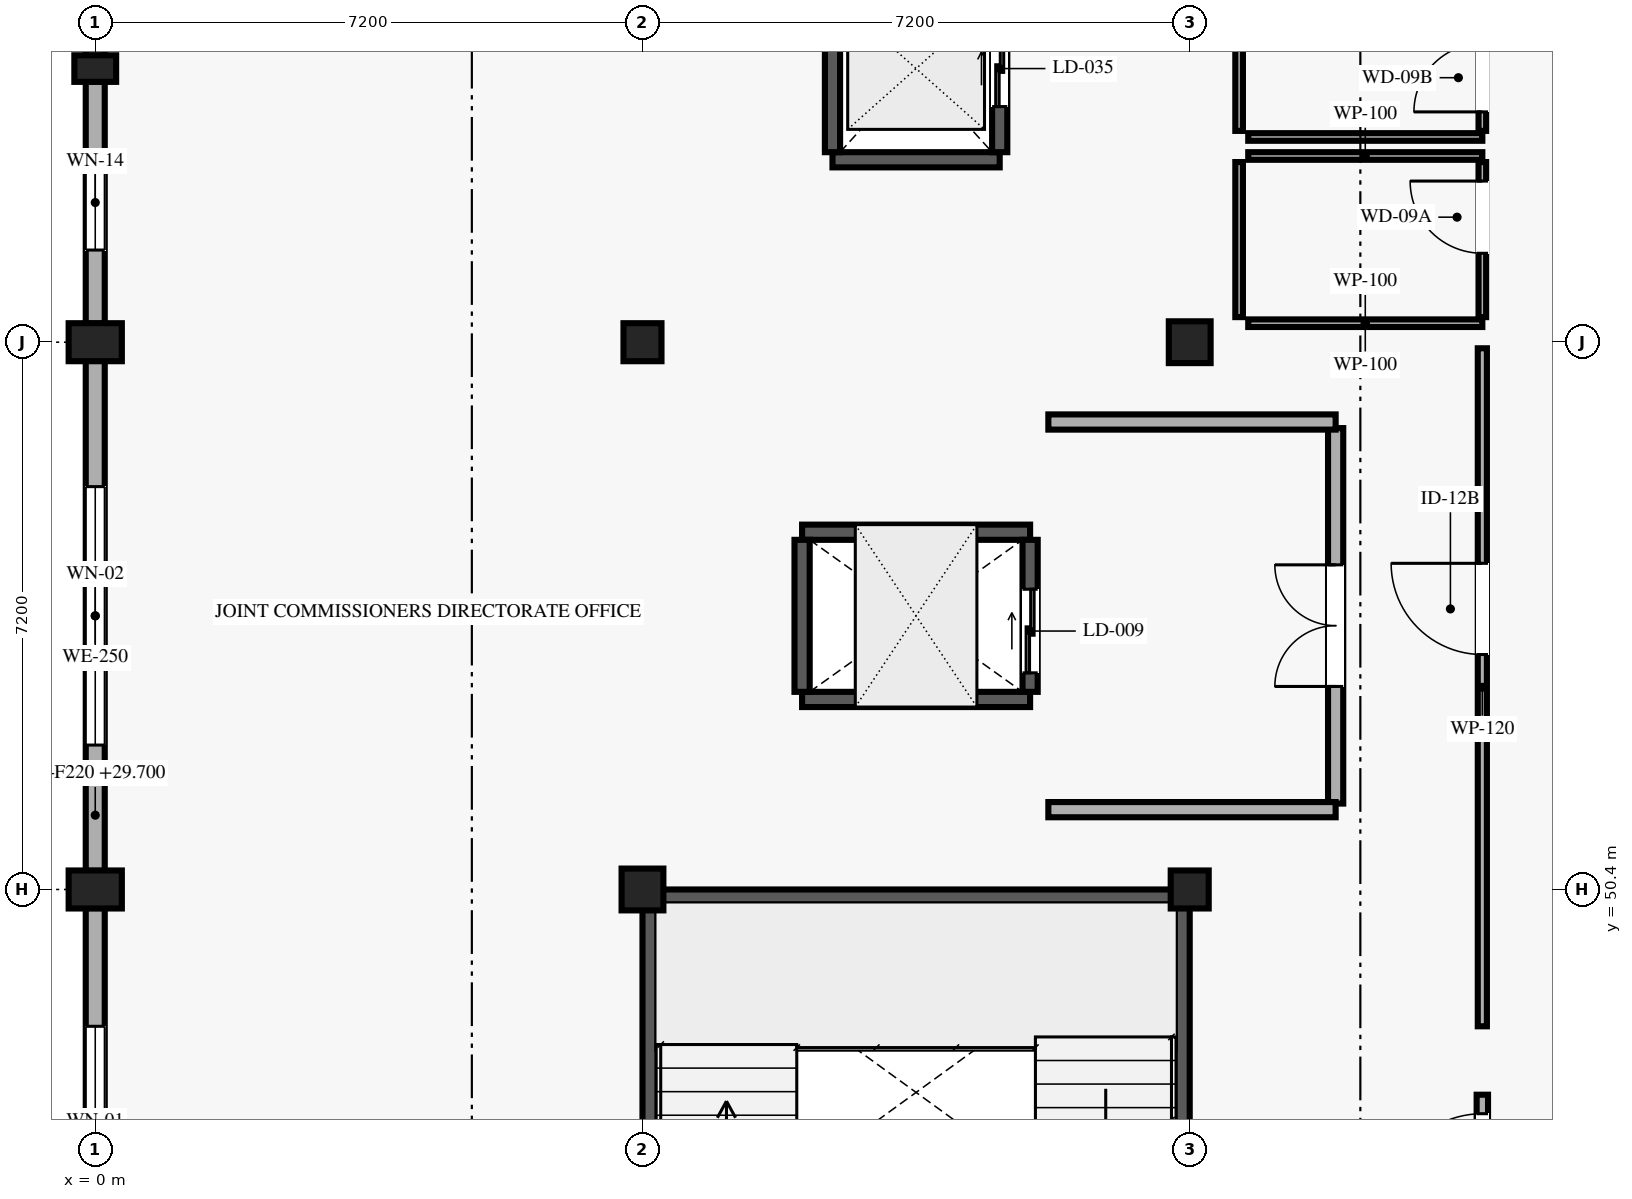
"""IFC4 building model, lengths in metres.
Left out: names, types, materials, properties, quantities, classifications, styles, units other than length and angle.
Written with IfcOpenShell. Run it as: python <this file> out.ifc"""

import sys

from ifc_helpers import new_model, si_unit, direction, frame, frame_2d, origin, origin_2d, place, context, subcontext, project, spatial, rectangle, extrude, element, fill, save


model = new_model("IFC4")
c1 = context("Model", 3, precision=1e-05, world=origin(), true_north=direction((0.0, 1.0)))
c2 = subcontext(c1, "Body", "Model", "MODEL_VIEW")
j1 = project(units=[si_unit("LENGTHUNIT", "METRE"), si_unit("PLANEANGLEUNIT", "RADIAN")], contexts=[c1])
p1 = place(None, origin())
s1 = spatial("IfcSite", under=j1, at=p1, CompositionType="ELEMENT")
p2 = place(p1, origin())
s2 = spatial("IfcBuilding", under=s1, at=p2, CompositionType="ELEMENT")
p3 = place(p2, frame((0.0, 0.0, 29.7)))
s3 = spatial("IfcBuildingStorey", under=s2, at=p3, CompositionType="ELEMENT", Elevation=29.7)
for number, where, z_axis, x_axis in (
    (1, (0.0, 50.4, 0.0), (0.0, 0.0, 1.0), (0.0, 1.0, 0.0)),
    (2, (0.0, 57.6, 0.0), (0.0, 0.0, 1.0), (0.0, 1.0, 0.0)),
):
    element("IfcColumn", number, at=place(p3, frame(where, z_axis=z_axis, x_axis=x_axis)), inside=s3, PredefinedType="COLUMN", context=c2, shape_type="SweptSolid", body=[
        extrude(rectangle(XDim=0.5, YDim=0.7, at=origin_2d()), origin(), (0.0, 0.0, 1.0), 4.05),
    ])
p4 = place(p3, frame((7.2, 50.4, 0.0), z_axis=(0.0, 0.0, 1.0), x_axis=(1.0, 0.0, 0.0)))
e3 = element("IfcColumn", 3, at=p4, inside=s3, PredefinedType="COLUMN", context=c2, shape_type="SweptSolid", body=[
    extrude(rectangle(XDim=0.55, YDim=0.55, at=origin_2d()), origin(), (0.0, 0.0, 1.0), 4.05),
])
for number, where, z_axis, x_axis in (
    (4, (7.2, 57.6, 0.0), (0.0, 0.0, 1.0), (1.0, 0.0, 0.0)),
    (5, (14.4, 50.4, 0.0), (0.0, 0.0, 1.0), (1.0, 0.0, 0.0)),
):
    element("IfcColumn", number, at=place(p3, frame(where, z_axis=z_axis, x_axis=x_axis)), inside=s3, PredefinedType="COLUMN", context=c2, shape_type="SweptSolid", body=[
        extrude(rectangle(XDim=0.5, YDim=0.5, at=origin_2d()), origin(), (0.0, 0.0, 1.0), 4.05),
    ])
p5 = place(p3, frame((14.4, 57.6, 0.0), z_axis=(0.0, 0.0, 1.0), x_axis=(1.0, 0.0, 0.0)))
e6 = element("IfcColumn", 6, at=p5, inside=s3, PredefinedType="COLUMN", context=c2, shape_type="SweptSolid", body=[
    extrude(rectangle(XDim=0.55, YDim=0.55, at=origin_2d()), origin(), (0.0, 0.0, 1.0), 4.05),
])
p6 = place(p3, frame((0.0, 61.2, 0.0), z_axis=(0.0, 0.0, 1.0), x_axis=(0.0, 1.0, 0.0)))
e7 = element("IfcColumn", 7, at=p6, inside=s3, PredefinedType="PILASTER", context=c2, shape_type="SweptSolid", body=[
    extrude(rectangle(XDim=0.35, YDim=0.55, at=origin_2d()), origin(), (0.0, 0.0, 1.0), 4.05),
])
p7 = place(p3, frame((0.0, 43.445, 0.0), z_axis=(0.0, 0.0, 1.0), x_axis=(0.0, 1.0, 0.0)))
e8 = element("IfcWall", 8, at=p7, inside=s3, PredefinedType="SOLIDWALL", context=c2, shape_type="SweptSolid", body=[
    extrude(rectangle(XDim=6.71, YDim=0.25, at=frame_2d((3.355, 0.0))), origin(), (0.0, 0.0, 1.0), 3.295),
])
p8 = place(p7, frame((1.555, 0.0, 0.85)))
e9 = element("IfcOpeningElement", 9, at=p8, cuts=e8, PredefinedType="OPENING", context=c2, shape_type="SweptSolid", body=[
    extrude(rectangle(XDim=3.6, YDim=2.05, at=frame_2d((1.8, 1.025))), frame((0.0, 0.135, 0.0), z_axis=(0.0, -1.0, 0.0), x_axis=(1.0, 0.0, 0.0)), (0.0, 0.0, 1.0), 0.27),
])
p9 = place(p3, frame((0.0, 50.645, 0.0), z_axis=(0.0, 0.0, 1.0), x_axis=(0.0, 1.0, 0.0)))
e10 = element("IfcWall", 10, at=p9, inside=s3, PredefinedType="SOLIDWALL", context=c2, shape_type="SweptSolid", body=[
    extrude(rectangle(XDim=6.71, YDim=0.25, at=frame_2d((3.355, 0.0))), origin(), (0.0, 0.0, 1.0), 3.295),
])
p10 = place(p9, frame((1.655, 0.0, 0.85)))
e11 = element("IfcOpeningElement", 11, at=p10, cuts=e10, PredefinedType="OPENING", context=c2, shape_type="SweptSolid", body=[
    extrude(rectangle(XDim=3.4, YDim=2.0, at=frame_2d((1.7, 1.0))), frame((0.0, 0.135, 0.0), z_axis=(0.0, -1.0, 0.0), x_axis=(1.0, 0.0, 0.0)), (0.0, 0.0, 1.0), 0.27),
])
p11 = place(p3, frame((0.0, 57.845, 0.0), z_axis=(0.0, 0.0, 1.0), x_axis=(0.0, 1.0, 0.0)))
e12 = element("IfcWall", 12, at=p11, inside=s3, PredefinedType="SOLIDWALL", context=c2, shape_type="SweptSolid", body=[
    extrude(rectangle(XDim=3.185, YDim=0.25, at=frame_2d((1.593, 0.0))), origin(), (0.0, 0.0, 1.0), 3.295),
])
p12 = place(p11, frame((0.968, 0.0, 0.85)))
e13 = element("IfcOpeningElement", 13, at=p12, cuts=e12, PredefinedType="OPENING", context=c2, shape_type="SweptSolid", body=[
    extrude(rectangle(XDim=1.25, YDim=1.5, at=frame_2d((0.625, 0.75))), frame((0.0, 0.135, 0.0), z_axis=(0.0, -1.0, 0.0), x_axis=(1.0, 0.0, 0.0)), (0.0, 0.0, 1.0), 0.27),
])
p13 = place(p3, frame((0.0, 61.37, 0.0), z_axis=(0.0, 0.0, 1.0), x_axis=(0.0, 1.0, 0.0)))
e14 = element("IfcWall", 14, at=p13, inside=s3, PredefinedType="SOLIDWALL", context=c2, shape_type="SweptSolid", body=[
    extrude(rectangle(XDim=3.185, YDim=0.25, at=frame_2d((1.592, 0.0))), origin(), (0.0, 0.0, 1.0), 3.295),
])
p14 = place(p13, frame((0.968, 0.0, 0.85)))
e15 = element("IfcOpeningElement", 15, at=p14, cuts=e14, PredefinedType="OPENING", context=c2, shape_type="SweptSolid", body=[
    extrude(rectangle(XDim=1.25, YDim=1.5, at=frame_2d((0.625, 0.75))), frame((0.0, 0.135, 0.0), z_axis=(0.0, -1.0, 0.0), x_axis=(1.0, 0.0, 0.0)), (0.0, 0.0, 1.0), 0.27),
])
for number, where, z_axis, x_axis in (
    (16, (7.4, 50.3, 0.0), (0.0, 0.0, 1.0), (1.0, 0.0, 0.0)),
    (17, (7.3, 43.4, 0.0), (0.0, 0.0, 1.0), (0.0, 1.0, 0.0)),
    (18, (14.3, 43.4, 0.0), (0.0, 0.0, 1.0), (0.0, 1.0, 0.0)),
):
    element("IfcWall", number, at=place(p3, frame(where, z_axis=z_axis, x_axis=x_axis)), inside=s3, PredefinedType="SHEAR", context=c2, shape_type="SweptSolid", body=[
        extrude(rectangle(XDim=6.8, YDim=0.2, at=frame_2d((3.4, 0.0))), origin(), (0.0, 0.0, 1.0), 3.83),
    ])
for number, where, z_axis, x_axis in (
    (19, (9.3, 52.9, 0.0), (0.0, 0.0, 1.0), (1.0, 0.0, 0.0)),
    (20, (9.3, 55.1, 0.0), (0.0, 0.0, 1.0), (1.0, 0.0, 0.0)),
):
    element("IfcWall", number, at=place(p3, frame(where, z_axis=z_axis, x_axis=x_axis)), inside=s3, PredefinedType="SHEAR", context=c2, shape_type="SweptSolid", body=[
        extrude(rectangle(XDim=3.0, YDim=0.2, at=frame_2d((1.5, 0.0))), origin(), (0.0, 0.0, 1.0), 3.83),
    ])
p15 = place(p3, frame((9.3, 53.0, 0.0), z_axis=(0.0, 0.0, 1.0), x_axis=(0.0, 1.0, 0.0)))
e21 = element("IfcWall", 21, at=p15, inside=s3, PredefinedType="SHEAR", context=c2, shape_type="SweptSolid", body=[
    extrude(rectangle(XDim=2.0, YDim=0.2, at=frame_2d((1.0, 0.0))), origin(), (0.0, 0.0, 1.0), 3.83),
])
p16 = place(p3, frame((12.3, 53.0, 0.0), z_axis=(0.0, 0.0, 1.0), x_axis=(0.0, 1.0, 0.0)))
e22 = element("IfcWall", 22, at=p16, inside=s3, PredefinedType="SHEAR", context=c2, shape_type="SweptSolid", body=[
    extrude(rectangle(XDim=2.0, YDim=0.2, at=frame_2d((1.0, 0.0))), origin(), (0.0, 0.0, 1.0), 3.83),
])
p17 = place(p16, frame((0.25, 0.0, 0.0)))
e23 = element("IfcOpeningElement", 23, at=p17, cuts=e22, PredefinedType="OPENING", context=c2, shape_type="SweptSolid", body=[
    extrude(rectangle(XDim=1.1, YDim=2.15, at=frame_2d((0.55, 1.075))), frame((0.0, 0.11, 0.0), z_axis=(0.0, -1.0, 0.0), x_axis=(1.0, 0.0, 0.0)), (0.0, 0.0, 1.0), 0.22),
])
for number, where, z_axis, x_axis in (
    (24, (9.7, 60.0, 0.0), (0.0, 0.0, 1.0), (1.0, 0.0, 0.0)),
    (25, (9.7, 60.1, 0.0), (0.0, 0.0, 1.0), (0.0, 1.0, 0.0)),
):
    element("IfcWall", number, at=place(p3, frame(where, z_axis=z_axis, x_axis=x_axis)), inside=s3, PredefinedType="SHEAR", context=c2, shape_type="SweptSolid", body=[
        extrude(rectangle(XDim=2.2, YDim=0.2, at=frame_2d((1.1, 0.0))), origin(), (0.0, 0.0, 1.0), 3.83),
    ])
p18 = place(p3, frame((11.9, 60.1, 0.0), z_axis=(0.0, 0.0, 1.0), x_axis=(0.0, 1.0, 0.0)))
e26 = element("IfcWall", 26, at=p18, inside=s3, PredefinedType="SHEAR", context=c2, shape_type="SweptSolid", body=[
    extrude(rectangle(XDim=2.2, YDim=0.2, at=frame_2d((1.1, 0.0))), origin(), (0.0, 0.0, 1.0), 3.83),
])
p19 = place(p18, frame((0.6, 0.0, 0.0)))
e27 = element("IfcOpeningElement", 27, at=p19, cuts=e26, PredefinedType="OPENING", context=c2, shape_type="SweptSolid", body=[
    extrude(rectangle(XDim=1.0, YDim=2.1, at=frame_2d((0.5, 1.05))), frame((0.0, 0.11, 0.0), z_axis=(0.0, -1.0, 0.0), x_axis=(1.0, 0.0, 0.0)), (0.0, 0.0, 1.0), 0.22),
])
p20 = place(p3, frame((16.32, 51.53, 0.0), z_axis=(0.0, 0.0, 1.0), x_axis=(0.0, 1.0, 0.0)))
e28 = element("IfcWall", 28, at=p20, inside=s3, PredefinedType="SOLIDWALL", context=c2, shape_type="SweptSolid", body=[
    extrude(rectangle(XDim=4.94, YDim=0.2, at=frame_2d((2.47, 0.0))), origin(), (0.0, 0.0, 1.0), 3.83),
])
p21 = place(p20, frame((1.541, 0.0, 0.0)))
e29 = element("IfcOpeningElement", 29, at=p21, cuts=e28, PredefinedType="OPENING", context=c2, shape_type="SweptSolid", body=[
    extrude(rectangle(XDim=1.6, YDim=2.2, at=frame_2d((0.8, 1.1))), frame((0.0, 0.11, 0.0), z_axis=(0.0, -1.0, 0.0), x_axis=(1.0, 0.0, 0.0)), (0.0, 0.0, 1.0), 0.22),
])
for number, where, z_axis, x_axis in (
    (30, (12.54, 51.45, 0.0), (0.0, 0.0, 1.0), (1.0, 0.0, 0.0)),
    (31, (12.54, 56.55, 0.0), (0.0, 0.0, 1.0), (1.0, 0.0, 0.0)),
):
    element("IfcWall", number, at=place(p3, frame(where, z_axis=z_axis, x_axis=x_axis)), inside=s3, PredefinedType="SOLIDWALL", context=c2, shape_type="SweptSolid", body=[
        extrude(rectangle(XDim=3.78, YDim=0.2, at=frame_2d((1.89, 0.0))), origin(), (0.0, 0.0, 1.0), 3.83),
    ])
p22 = place(p3, frame((18.25, 57.93, 0.0), z_axis=(0.0, 0.0, 1.0), x_axis=(0.0, 1.0, 0.0)))
e32 = element("IfcWall", 32, at=p22, inside=s3, PredefinedType="PARTITIONING", context=c2, shape_type="SweptSolid", body=[
    extrude(rectangle(XDim=2.04, YDim=0.1, at=frame_2d((1.02, 0.0))), origin(), (0.0, 0.0, 1.0), 3.83),
])
p23 = place(p22, frame((0.84, 0.0, 0.0)))
e33 = element("IfcOpeningElement", 33, at=p23, cuts=e32, PredefinedType="OPENING", context=c2, shape_type="SweptSolid", body=[
    extrude(rectangle(XDim=0.95, YDim=2.1, at=frame_2d((0.475, 1.05))), frame((0.0, 0.06, 0.0), z_axis=(0.0, -1.0, 0.0), x_axis=(1.0, 0.0, 0.0)), (0.0, 0.0, 1.0), 0.12),
])
p24 = place(p3, frame((15.17, 57.85, 0.0), z_axis=(0.0, 0.0, 1.0), x_axis=(1.0, 0.0, 0.0)))
e34 = element("IfcWall", 34, at=p24, inside=s3, PredefinedType="PARTITIONING", context=c2, shape_type="SweptSolid", body=[
    extrude(rectangle(XDim=3.08, YDim=0.1, at=frame_2d((1.54, 0.0))), origin(), (0.0, 0.0, 1.0), 3.32),
])
p25 = place(p3, frame((15.17, 60.05, 0.0), z_axis=(0.0, 0.0, 1.0), x_axis=(1.0, 0.0, 0.0)))
e35 = element("IfcWall", 35, at=p25, inside=s3, PredefinedType="PARTITIONING", context=c2, shape_type="SweptSolid", body=[
    extrude(rectangle(XDim=3.08, YDim=0.1, at=frame_2d((1.54, 0.0))), origin(), (0.0, 0.0, 1.0), 3.83),
])
p26 = place(p3, frame((15.05, 57.93, 0.0), z_axis=(0.0, 0.0, 1.0), x_axis=(0.0, 1.0, 0.0)))
e36 = element("IfcWall", 36, at=p26, inside=s3, PredefinedType="PARTITIONING", context=c2, shape_type="SweptSolid", body=[
    extrude(rectangle(XDim=2.04, YDim=0.1, at=frame_2d((1.02, 0.0))), origin(), (0.0, 0.0, 1.0), 3.83),
])
p27 = place(p3, frame((18.25, 60.38, 0.0), z_axis=(0.0, 0.0, 1.0), x_axis=(0.0, 1.0, 0.0)))
e37 = element("IfcWall", 37, at=p27, inside=s3, PredefinedType="PARTITIONING", context=c2, shape_type="SweptSolid", body=[
    extrude(rectangle(XDim=2.29, YDim=0.1, at=frame_2d((1.145, 0.0))), origin(), (0.0, 0.0, 1.0), 3.83),
])
p28 = place(p27, frame((0.25, 0.0, 0.0)))
e38 = element("IfcOpeningElement", 38, at=p28, cuts=e37, PredefinedType="OPENING", context=c2, shape_type="SweptSolid", body=[
    extrude(rectangle(XDim=0.9, YDim=2.1, at=frame_2d((0.45, 1.05))), frame((0.0, 0.06, 0.0), z_axis=(0.0, -1.0, 0.0), x_axis=(1.0, 0.0, 0.0)), (0.0, 0.0, 1.0), 0.12),
])
p29 = place(p3, frame((15.17, 60.3, 0.0), z_axis=(0.0, 0.0, 1.0), x_axis=(1.0, 0.0, 0.0)))
e39 = element("IfcWall", 39, at=p29, inside=s3, PredefinedType="PARTITIONING", context=c2, shape_type="SweptSolid", body=[
    extrude(rectangle(XDim=3.08, YDim=0.1, at=frame_2d((1.54, 0.0))), origin(), (0.0, 0.0, 1.0), 3.83),
])
p30 = place(p3, frame((15.05, 60.38, 0.0), z_axis=(0.0, 0.0, 1.0), x_axis=(0.0, 1.0, 0.0)))
e40 = element("IfcWall", 40, at=p30, inside=s3, PredefinedType="PARTITIONING", context=c2, shape_type="SweptSolid", body=[
    extrude(rectangle(XDim=2.29, YDim=0.1, at=frame_2d((1.145, 0.0))), origin(), (0.0, 0.0, 1.0), 3.83),
])
p31 = place(p3, frame((18.25, 36.55, 0.0), z_axis=(0.0, 0.0, 1.0), x_axis=(0.0, 1.0, 0.0)))
e41 = element("IfcWall", 41, at=p31, inside=s3, PredefinedType="PARTITIONING", context=c2, shape_type="SweptSolid", body=[
    extrude(rectangle(XDim=11.15, YDim=0.15, at=frame_2d((5.575, 0.0))), origin(), (0.0, 0.0, 1.0), 3.83),
])
p32 = place(p31, frame((9.65, 0.0, 0.0)))
e42 = element("IfcOpeningElement", 42, at=p32, cuts=e41, PredefinedType="OPENING", context=c2, shape_type="SweptSolid", body=[
    extrude(rectangle(XDim=1.25, YDim=2.2, at=frame_2d((0.625, 1.1))), frame((0.0, 0.085, 0.0), z_axis=(0.0, -1.0, 0.0), x_axis=(1.0, 0.0, 0.0)), (0.0, 0.0, 1.0), 0.17),
])
p33 = place(p3, frame((18.25, 48.6, 0.0), z_axis=(0.0, 0.0, 1.0), x_axis=(0.0, 1.0, 0.0)))
e43 = element("IfcWall", 43, at=p33, inside=s3, PredefinedType="PARTITIONING", context=c2, shape_type="SweptSolid", body=[
    extrude(rectangle(XDim=8.92, YDim=0.12, at=frame_2d((4.46, 0.0))), origin(), (0.0, 0.0, 1.0), 3.83),
])
p34 = place(p33, frame((4.891, 0.0, 0.0)))
e44 = element("IfcOpeningElement", 44, at=p34, cuts=e43, PredefinedType="OPENING", context=c2, shape_type="SweptSolid", body=[
    extrude(rectangle(XDim=1.2, YDim=2.15, at=frame_2d((0.6, 1.075))), frame((0.0, 0.07, 0.0), z_axis=(0.0, -1.0, 0.0), x_axis=(1.0, 0.0, 0.0)), (0.0, 0.0, 1.0), 0.14),
])
p35 = place(p8, origin())
e45 = element("IfcWindow", 45, at=p35, inside=s3, PartitioningType="SINGLE_PANEL", PredefinedType="WINDOW", context=c2, shape_type="SweptSolid", body=[
    extrude(rectangle(XDim=3.6, YDim=2.05, at=frame_2d((1.8, 1.025))), frame((0.0, 0.03, 0.0), z_axis=(0.0, -1.0, 0.0), x_axis=(1.0, 0.0, 0.0)), (0.0, 0.0, 1.0), 0.06),
])
fill(e9, e45)
p36 = place(p10, origin())
e46 = element("IfcWindow", 46, at=p36, inside=s3, PartitioningType="SINGLE_PANEL", PredefinedType="WINDOW", context=c2, shape_type="SweptSolid", body=[
    extrude(rectangle(XDim=3.4, YDim=2.0, at=frame_2d((1.7, 1.0))), frame((0.0, 0.03, 0.0), z_axis=(0.0, -1.0, 0.0), x_axis=(1.0, 0.0, 0.0)), (0.0, 0.0, 1.0), 0.06),
])
fill(e11, e46)
p37 = place(p12, origin())
e47 = element("IfcWindow", 47, at=p37, inside=s3, PartitioningType="SINGLE_PANEL", PredefinedType="WINDOW", context=c2, shape_type="SweptSolid", body=[
    extrude(rectangle(XDim=1.25, YDim=1.5, at=frame_2d((0.625, 0.75))), frame((0.0, 0.03, 0.0), z_axis=(0.0, -1.0, 0.0), x_axis=(1.0, 0.0, 0.0)), (0.0, 0.0, 1.0), 0.06),
])
fill(e13, e47)
p38 = place(p17, origin())
e48 = element("IfcDoor", 48, at=p38, inside=s3, OperationType="DOUBLE_DOOR_SLIDING", PredefinedType="DOOR", context=c2, shape_type="SweptSolid", body=[
    extrude(rectangle(XDim=1.1, YDim=2.15, at=frame_2d((0.55, 1.075))), frame((0.0, 0.025, 0.0), z_axis=(0.0, -1.0, 0.0), x_axis=(1.0, 0.0, 0.0)), (0.0, 0.0, 1.0), 0.05),
])
fill(e23, e48)
p39 = place(p19, origin())
e49 = element("IfcDoor", 49, at=p39, inside=s3, OperationType="DOUBLE_DOOR_SLIDING", PredefinedType="DOOR", context=c2, shape_type="SweptSolid", body=[
    extrude(rectangle(XDim=1.0, YDim=2.1, at=frame_2d((0.5, 1.05))), frame((0.0, 0.025, 0.0), z_axis=(0.0, -1.0, 0.0), x_axis=(1.0, 0.0, 0.0)), (0.0, 0.0, 1.0), 0.05),
])
fill(e27, e49)
p40 = place(p21, origin())
e50 = element("IfcDoor", 50, at=p40, inside=s3, OperationType="DOUBLE_DOOR_SINGLE_SWING", PredefinedType="DOOR", context=c2, shape_type="SweptSolid", body=[
    extrude(rectangle(XDim=1.6, YDim=2.2, at=frame_2d((0.8, 1.1))), frame((0.0, 0.025, 0.0), z_axis=(0.0, -1.0, 0.0), x_axis=(1.0, 0.0, 0.0)), (0.0, 0.0, 1.0), 0.05),
])
fill(e29, e50)
p41 = place(p23, origin())
e51 = element("IfcDoor", 51, at=p41, inside=s3, OperationType="SINGLE_SWING_RIGHT", PredefinedType="DOOR", context=c2, shape_type="SweptSolid", body=[
    extrude(rectangle(XDim=0.95, YDim=2.1, at=frame_2d((0.475, 1.05))), frame((0.0, 0.025, 0.0), z_axis=(0.0, -1.0, 0.0), x_axis=(1.0, 0.0, 0.0)), (0.0, 0.0, 1.0), 0.05),
])
fill(e33, e51)
p42 = place(p28, origin())
e52 = element("IfcDoor", 52, at=p42, inside=s3, OperationType="SINGLE_SWING_LEFT", PredefinedType="DOOR", context=c2, shape_type="SweptSolid", body=[
    extrude(rectangle(XDim=0.9, YDim=2.1, at=frame_2d((0.45, 1.05))), frame((0.0, 0.025, 0.0), z_axis=(0.0, -1.0, 0.0), x_axis=(1.0, 0.0, 0.0)), (0.0, 0.0, 1.0), 0.05),
])
fill(e38, e52)
p43 = place(p32, origin())
e53 = element("IfcDoor", 53, at=p43, inside=s3, OperationType="SINGLE_SWING_LEFT", PredefinedType="DOOR", context=c2, shape_type="SweptSolid", body=[
    extrude(rectangle(XDim=1.25, YDim=2.2, at=frame_2d((0.625, 1.1))), frame((0.0, 0.025, 0.0), z_axis=(0.0, -1.0, 0.0), x_axis=(1.0, 0.0, 0.0)), (0.0, 0.0, 1.0), 0.05),
])
fill(e42, e53)
p44 = place(p34, origin())
e54 = element("IfcDoor", 54, at=p44, inside=s3, OperationType="SINGLE_SWING_RIGHT", PredefinedType="DOOR", context=c2, shape_type="SweptSolid", body=[
    extrude(rectangle(XDim=1.2, YDim=2.15, at=frame_2d((0.6, 1.075))), frame((0.0, 0.025, 0.0), z_axis=(0.0, -1.0, 0.0), x_axis=(1.0, 0.0, 0.0)), (0.0, 0.0, 1.0), 0.05),
])
fill(e44, e54)
save(model, sys.argv[1])
